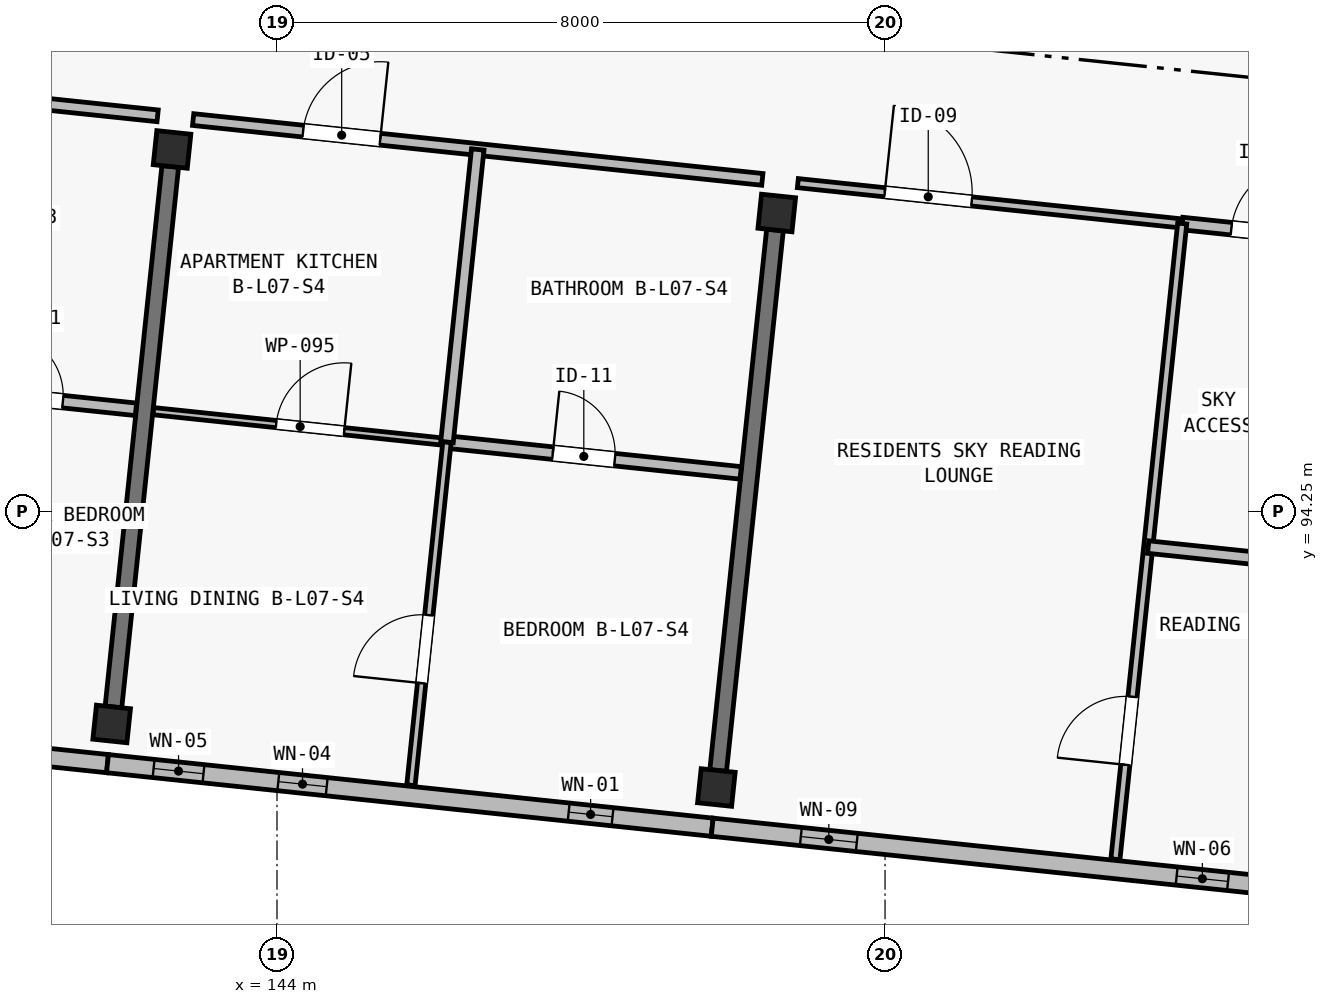
"""IFC4 building model, lengths in metres.
Left out: names, types, materials, properties, quantities, classifications, styles, units other than length and angle.
Written with IfcOpenShell. Run it as: python <this file> out.ifc"""

import sys

from ifc_helpers import new_model, si_unit, direction, frame, frame_2d, origin, origin_2d, place, context, subcontext, project, spatial, rectangle, extrude, element, fill, save


model = new_model("IFC4")
c1 = context("Model", 3, precision=1e-05, world=origin(), true_north=direction((0.0, 1.0)))
c2 = subcontext(c1, "Body", "Model", "MODEL_VIEW")
j1 = project(units=[si_unit("LENGTHUNIT", "METRE"), si_unit("PLANEANGLEUNIT", "RADIAN")], contexts=[c1])
p1 = place(None, origin())
s1 = spatial("IfcSite", under=j1, at=p1, CompositionType="ELEMENT")
p2 = place(p1, origin())
s2 = spatial("IfcBuilding", under=s1, at=p2, CompositionType="ELEMENT")
p3 = place(p2, frame((0.0, 0.0, 24.65)))
s3 = spatial("IfcBuildingStorey", under=s2, at=p3, CompositionType="ELEMENT", Elevation=24.65)
for number, where, z_axis, x_axis in (
    (1, (141.825, 91.455, 0.0), (0.0, 0.0, 1.0), (0.995, -0.105, 0.0)),
    (2, (142.619, 99.013, 0.0), (0.0, 0.0, 1.0), (0.995, -0.105, 0.0)),
    (3, (149.781, 90.619, 0.0), (0.0, 0.0, 1.0), (0.995, -0.105, 0.0)),
    (4, (150.575, 98.177, 0.0), (0.0, 0.0, 1.0), (0.995, -0.105, 0.0)),
):
    element("IfcColumn", number, at=place(p3, frame(where, z_axis=z_axis, x_axis=x_axis)), inside=s3, PredefinedType="COLUMN", context=c2, shape_type="SweptSolid", body=[
        extrude(rectangle(XDim=0.45, YDim=0.45, at=origin_2d()), origin(), (0.0, 0.0, 1.0), 3.25),
    ])
p4 = place(p3, frame((141.848, 91.679, 0.0), z_axis=(0.0, 0.0, 1.0), x_axis=(0.104553253602, 0.994519289487, 0.0)))
e5 = element("IfcWall", 5, at=p4, inside=s3, PredefinedType="SHEAR", context=c2, shape_type="SweptSolid", body=[
    extrude(rectangle(XDim=7.15, YDim=0.22, at=frame_2d((3.575, 0.0))), origin(), (0.0, 0.0, 1.0), 2.5),
])
p5 = place(p3, frame((149.804, 90.843, 0.0), z_axis=(0.0, 0.0, 1.0), x_axis=(0.104519481265, 0.994522839374, 0.0)))
e6 = element("IfcWall", 6, at=p5, inside=s3, PredefinedType="SHEAR", context=c2, shape_type="SweptSolid", body=[
    extrude(rectangle(XDim=7.15, YDim=0.22, at=frame_2d((3.575, 0.0))), origin(), (0.0, 0.0, 1.0), 2.5),
])
p6 = place(p3, frame((141.77, 90.933, 0.0), z_axis=(0.0, 0.0, 1.0), x_axis=(-0.994519156568, 0.104554517933, 0.0)))
e7 = element("IfcWall", 7, at=p6, inside=s3, PredefinedType="SOLIDWALL", context=c2, shape_type="SweptSolid", body=[
    extrude(rectangle(XDim=8.0, YDim=0.24, at=frame_2d((4.0, 0.0))), origin(), (0.0, 0.0, 1.0), 3.0),
])
p7 = place(p6, frame((5.345, 0.0, 0.0)))
e8 = element("IfcOpeningElement", 8, at=p7, cuts=e7, PredefinedType="OPENING", context=c2, shape_type="SweptSolid", body=[
    extrude(rectangle(XDim=1.8, YDim=2.12, at=frame_2d((0.9, 1.06))), frame((0.0, 0.135, 0.0), z_axis=(0.0, -1.0, 0.0), x_axis=(1.0, 0.0, 0.0)), (0.0, 0.0, 1.0), 0.27),
])
p8 = place(p6, frame((0.83, 0.0, 0.46)))
e9 = element("IfcOpeningElement", 9, at=p8, cuts=e7, PredefinedType="OPENING", context=c2, shape_type="SweptSolid", body=[
    extrude(rectangle(XDim=0.68, YDim=2.24, at=frame_2d((0.34, 1.12))), frame((0.0, 0.135, 0.0), z_axis=(0.0, -1.0, 0.0), x_axis=(1.0, 0.0, 0.0)), (0.0, 0.0, 1.0), 0.27),
])
p9 = place(p3, frame((149.726, 90.097, 0.0), z_axis=(0.0, 0.0, 1.0), x_axis=(-0.994522662826, 0.104521161134, 0.0)))
e10 = element("IfcWall", 10, at=p9, inside=s3, PredefinedType="SOLIDWALL", context=c2, shape_type="SweptSolid", body=[
    extrude(rectangle(XDim=8.0, YDim=0.24, at=frame_2d((4.0, 0.0))), origin(), (0.0, 0.0, 1.0), 3.0),
])
p10 = place(p9, frame((1.319, 0.0, 0.52)))
e11 = element("IfcOpeningElement", 11, at=p10, cuts=e10, PredefinedType="OPENING", context=c2, shape_type="SweptSolid", body=[
    extrude(rectangle(XDim=0.58, YDim=2.16, at=frame_2d((0.29, 1.08))), frame((0.0, 0.135, 0.0), z_axis=(0.0, -1.0, 0.0), x_axis=(1.0, 0.0, 0.0)), (0.0, 0.0, 1.0), 0.27),
])
p11 = place(p9, frame((5.1, 0.0, 0.52)))
e12 = element("IfcOpeningElement", 12, at=p11, cuts=e10, PredefinedType="OPENING", context=c2, shape_type="SweptSolid", body=[
    extrude(rectangle(XDim=0.64, YDim=2.18, at=frame_2d((0.32, 1.09))), frame((0.0, 0.135, 0.0), z_axis=(0.0, -1.0, 0.0), x_axis=(1.0, 0.0, 0.0)), (0.0, 0.0, 1.0), 0.27),
])
p12 = place(p9, frame((6.73, 0.0, 0.42)))
e13 = element("IfcOpeningElement", 13, at=p12, cuts=e10, PredefinedType="OPENING", context=c2, shape_type="SweptSolid", body=[
    extrude(rectangle(XDim=0.66, YDim=2.32, at=frame_2d((0.33, 1.16))), frame((0.0, 0.135, 0.0), z_axis=(0.0, -1.0, 0.0), x_axis=(1.0, 0.0, 0.0)), (0.0, 0.0, 1.0), 0.27),
])
p13 = place(p3, frame((158.204, 89.206, 0.0), z_axis=(0.0, 0.0, 1.0), x_axis=(-0.994521760736, 0.104529744196, 0.0)))
e14 = element("IfcWall", 14, at=p13, inside=s3, PredefinedType="SOLIDWALL", context=c2, shape_type="SweptSolid", body=[
    extrude(rectangle(XDim=8.525, YDim=0.24, at=frame_2d((4.262, 0.0))), origin(), (0.0, 0.0, 1.0), 3.0),
])
p14 = place(p13, frame((1.701, 0.0, 0.42)))
e15 = element("IfcOpeningElement", 15, at=p14, cuts=e14, PredefinedType="OPENING", context=c2, shape_type="SweptSolid", body=[
    extrude(rectangle(XDim=0.68, YDim=2.24, at=frame_2d((0.34, 1.12))), frame((0.0, 0.135, 0.0), z_axis=(0.0, -1.0, 0.0), x_axis=(1.0, 0.0, 0.0)), (0.0, 0.0, 1.0), 0.27),
])
p15 = place(p13, frame((6.612, 0.0, 0.42)))
e16 = element("IfcOpeningElement", 16, at=p15, cuts=e14, PredefinedType="OPENING", context=c2, shape_type="SweptSolid", body=[
    extrude(rectangle(XDim=0.74, YDim=2.26, at=frame_2d((0.37, 1.13))), frame((0.0, 0.135, 0.0), z_axis=(0.0, -1.0, 0.0), x_axis=(1.0, 0.0, 0.0)), (0.0, 0.0, 1.0), 0.27),
])
p16 = place(p3, frame((137.949, 99.927, 0.0), z_axis=(0.0, 0.0, 1.0), x_axis=(0.994526220308, -0.104487306019, 0.0)))
e17 = element("IfcWall", 17, at=p16, inside=s3, PredefinedType="PARTITIONING", context=c2, shape_type="SweptSolid", body=[
    extrude(rectangle(XDim=4.505, YDim=0.155, at=frame_2d((2.252, 0.0))), origin(), (0.0, 0.0, 1.0), 2.97),
])
p17 = place(p16, frame((0.557, 0.0, 0.0)))
e18 = element("IfcOpeningElement", 18, at=p17, cuts=e17, PredefinedType="OPENING", context=c2, shape_type="SweptSolid", body=[
    extrude(rectangle(XDim=0.98, YDim=2.15, at=frame_2d((0.49, 1.075))), frame((0.0, 0.093, 0.0), z_axis=(0.0, -1.0, 0.0), x_axis=(1.0, 0.0, 0.0)), (0.0, 0.0, 1.0), 0.185),
])
p18 = place(p3, frame((139.668, 95.855, 0.0), z_axis=(0.0, 0.0, 1.0), x_axis=(0.994522631864, -0.10452145574, 0.0)))
e19 = element("IfcWall", 19, at=p18, inside=s3, PredefinedType="PLUMBINGWALL", context=c2, shape_type="SweptSolid", body=[
    extrude(rectangle(XDim=2.49, YDim=0.165, at=frame_2d((1.245, 0.0))), origin(), (0.0, 0.0, 1.0), 2.97),
])
p19 = place(p18, frame((0.703, 0.0, 0.0)))
e20 = element("IfcOpeningElement", 20, at=p19, cuts=e19, PredefinedType="OPENING", context=c2, shape_type="SweptSolid", body=[
    extrude(rectangle(XDim=0.82, YDim=2.08, at=frame_2d((0.41, 1.04))), frame((0.0, 0.097, 0.0), z_axis=(0.0, -1.0, 0.0), x_axis=(1.0, 0.0, 0.0)), (0.0, 0.0, 1.0), 0.195),
])
p20 = place(p3, frame((142.897, 99.406, 0.0), z_axis=(0.0, 0.0, 1.0), x_axis=(0.994521785195, -0.104529511491, 0.0)))
e21 = element("IfcWall", 21, at=p20, inside=s3, PredefinedType="PARTITIONING", context=c2, shape_type="SweptSolid", body=[
    extrude(rectangle(XDim=7.53, YDim=0.155, at=frame_2d((3.765, 0.0))), origin(), (0.0, 0.0, 1.0), 2.97),
])
p21 = place(p20, frame((1.455, 0.0, 0.0)))
e22 = element("IfcOpeningElement", 22, at=p21, cuts=e21, PredefinedType="OPENING", context=c2, shape_type="SweptSolid", body=[
    extrude(rectangle(XDim=1.02, YDim=2.2, at=frame_2d((0.51, 1.1))), frame((0.0, 0.093, 0.0), z_axis=(0.0, -1.0, 0.0), x_axis=(1.0, 0.0, 0.0)), (0.0, 0.0, 1.0), 0.185),
])
p22 = place(p3, frame((142.373, 95.57, 0.0), z_axis=(0.0, 0.0, 1.0), x_axis=(0.994524375082, -0.104504867671, 0.0)))
e23 = element("IfcWall", 23, at=p22, inside=s3, PredefinedType="PARTITIONING", context=c2, shape_type="SweptSolid", body=[
    extrude(rectangle(XDim=3.885, YDim=0.095, at=frame_2d((1.942, 0.0))), origin(), (0.0, 0.0, 1.0), 2.97),
])
p23 = place(p22, frame((1.625, 0.0, 0.0)))
e24 = element("IfcOpeningElement", 24, at=p23, cuts=e23, PredefinedType="OPENING", context=c2, shape_type="SweptSolid", body=[
    extrude(rectangle(XDim=0.9, YDim=2.1, at=frame_2d((0.45, 1.05))), frame((0.0, 0.062, 0.0), z_axis=(0.0, -1.0, 0.0), x_axis=(1.0, 0.0, 0.0)), (0.0, 0.0, 1.0), 0.125),
])
p24 = place(p3, frame((146.237, 95.164, 0.0), z_axis=(0.0, 0.0, 1.0), x_axis=(0.994517841934, -0.104567021925, 0.0)))
e25 = element("IfcWall", 25, at=p24, inside=s3, PredefinedType="PLUMBINGWALL", context=c2, shape_type="SweptSolid", body=[
    extrude(rectangle(XDim=3.885, YDim=0.165, at=frame_2d((1.942, 0.0))), origin(), (0.0, 0.0, 1.0), 2.97),
])
p25 = place(p24, frame((1.4, 0.0, 0.0)))
e26 = element("IfcOpeningElement", 26, at=p25, cuts=e25, PredefinedType="OPENING", context=c2, shape_type="SweptSolid", body=[
    extrude(rectangle(XDim=0.82, YDim=2.08, at=frame_2d((0.41, 1.04))), frame((0.0, 0.097, 0.0), z_axis=(0.0, -1.0, 0.0), x_axis=(1.0, 0.0, 0.0)), (0.0, 0.0, 1.0), 0.195),
])
p26 = place(p3, frame((145.762, 90.649, 0.0), z_axis=(0.0, 0.0, 1.0), x_axis=(0.104539221709, 0.994520764552, 0.0)))
e27 = element("IfcWall", 27, at=p26, inside=s3, PredefinedType="PARTITIONING", context=c2, shape_type="SweptSolid", body=[
    extrude(rectangle(XDim=4.54, YDim=0.11, at=frame_2d((2.27, 0.0))), origin(), (0.0, 0.0, 1.0), 2.97),
])
p27 = place(p26, frame((1.35, 0.0, 0.0)))
e28 = element("IfcOpeningElement", 28, at=p27, cuts=e27, PredefinedType="OPENING", context=c2, shape_type="SweptSolid", body=[
    extrude(rectangle(XDim=0.9, YDim=2.1, at=frame_2d((0.45, 1.05))), frame((0.0, 0.07, 0.0), z_axis=(0.0, -1.0, 0.0), x_axis=(1.0, 0.0, 0.0)), (0.0, 0.0, 1.0), 0.14),
])
p28 = place(p3, frame((146.237, 95.164, 0.0), z_axis=(0.0, 0.0, 1.0), x_axis=(0.10453700162, 0.994520997914, 0.0)))
e29 = element("IfcWall", 29, at=p28, inside=s3, PredefinedType="PLUMBINGWALL", context=c2, shape_type="SweptSolid", body=[
    extrude(rectangle(XDim=3.87, YDim=0.165, at=frame_2d((1.935, 0.0))), origin(), (0.0, 0.0, 1.0), 2.97),
])
p29 = place(p3, frame((150.853, 98.57, 0.0), z_axis=(0.0, 0.0, 1.0), x_axis=(0.994522539851, -0.104522331238, 0.0)))
e30 = element("IfcWall", 30, at=p29, inside=s3, PredefinedType="PARTITIONING", context=c2, shape_type="SweptSolid", body=[
    extrude(rectangle(XDim=5.085, YDim=0.12, at=frame_2d((2.542, 0.0))), origin(), (0.0, 0.0, 1.0), 2.97),
])
p30 = place(p29, frame((1.15, 0.0, 0.0)))
e31 = element("IfcOpeningElement", 31, at=p30, cuts=e30, PredefinedType="OPENING", context=c2, shape_type="SweptSolid", body=[
    extrude(rectangle(XDim=1.15, YDim=2.15, at=frame_2d((0.575, 1.075))), frame((0.0, 0.075, 0.0), z_axis=(0.0, -1.0, 0.0), x_axis=(1.0, 0.0, 0.0)), (0.0, 0.0, 1.0), 0.15),
])
p31 = place(p3, frame((155.91, 98.039, 0.0), z_axis=(0.0, 0.0, 1.0), x_axis=(0.994526447543, -0.104485143144, 0.0)))
e32 = element("IfcWall", 32, at=p31, inside=s3, PredefinedType="PLUMBINGWALL", context=c2, shape_type="SweptSolid", body=[
    extrude(rectangle(XDim=2.61, YDim=0.165, at=frame_2d((1.305, 0.0))), origin(), (0.0, 0.0, 1.0), 2.97),
])
p32 = place(p31, frame((0.65, 0.0, 0.0)))
e33 = element("IfcOpeningElement", 33, at=p32, cuts=e32, PredefinedType="OPENING", context=c2, shape_type="SweptSolid", body=[
    extrude(rectangle(XDim=0.96, YDim=2.12, at=frame_2d((0.48, 1.06))), frame((0.0, 0.097, 0.0), z_axis=(0.0, -1.0, 0.0), x_axis=(1.0, 0.0, 0.0)), (0.0, 0.0, 1.0), 0.195),
])
p33 = place(p3, frame((155.031, 89.675, 0.0), z_axis=(0.0, 0.0, 1.0), x_axis=(0.10453518206, 0.994521189172, 0.0)))
e34 = element("IfcWall", 34, at=p33, inside=s3, PredefinedType="PARTITIONING", context=c2, shape_type="SweptSolid", body=[
    extrude(rectangle(XDim=8.41, YDim=0.12, at=frame_2d((4.205, 0.0))), origin(), (0.0, 0.0, 1.0), 2.97),
])
p34 = place(p33, frame((1.25, 0.0, 0.0)))
e35 = element("IfcOpeningElement", 35, at=p34, cuts=e34, PredefinedType="OPENING", context=c2, shape_type="SweptSolid", body=[
    extrude(rectangle(XDim=0.9, YDim=2.1, at=frame_2d((0.45, 1.05))), frame((0.0, 0.075, 0.0), z_axis=(0.0, -1.0, 0.0), x_axis=(1.0, 0.0, 0.0)), (0.0, 0.0, 1.0), 0.15),
])
p35 = place(p3, frame((155.463, 93.782, 0.0), z_axis=(0.0, 0.0, 1.0), x_axis=(0.994521452323, -0.104532678478, 0.0)))
e36 = element("IfcWall", 36, at=p35, inside=s3, PredefinedType="PLUMBINGWALL", context=c2, shape_type="SweptSolid", body=[
    extrude(rectangle(XDim=2.59, YDim=0.165, at=frame_2d((1.295, 0.0))), origin(), (0.0, 0.0, 1.0), 2.97),
])
p36 = place(p10, origin())
e37 = element("IfcWindow", 37, at=p36, inside=s3, PartitioningType="SINGLE_PANEL", PredefinedType="WINDOW", context=c2, shape_type="SweptSolid", body=[
    extrude(rectangle(XDim=0.58, YDim=2.16, at=frame_2d((0.29, 1.08))), frame((0.0, 0.03, 0.0), z_axis=(0.0, -1.0, 0.0), x_axis=(1.0, 0.0, 0.0)), (0.0, 0.0, 1.0), 0.06),
])
fill(e11, e37)
p37 = place(p11, origin())
e38 = element("IfcWindow", 38, at=p37, inside=s3, PartitioningType="SINGLE_PANEL", PredefinedType="WINDOW", context=c2, shape_type="SweptSolid", body=[
    extrude(rectangle(XDim=0.64, YDim=2.18, at=frame_2d((0.32, 1.09))), frame((0.0, 0.03, 0.0), z_axis=(0.0, -1.0, 0.0), x_axis=(1.0, 0.0, 0.0)), (0.0, 0.0, 1.0), 0.06),
])
fill(e12, e38)
p38 = place(p12, origin())
e39 = element("IfcWindow", 39, at=p38, inside=s3, PartitioningType="SINGLE_PANEL", PredefinedType="WINDOW", context=c2, shape_type="SweptSolid", body=[
    extrude(rectangle(XDim=0.66, YDim=2.32, at=frame_2d((0.33, 1.16))), frame((0.0, 0.03, 0.0), z_axis=(0.0, -1.0, 0.0), x_axis=(1.0, 0.0, 0.0)), (0.0, 0.0, 1.0), 0.06),
])
fill(e13, e39)
p39 = place(p14, origin())
e40 = element("IfcWindow", 40, at=p39, inside=s3, PartitioningType="SINGLE_PANEL", PredefinedType="WINDOW", context=c2, shape_type="SweptSolid", body=[
    extrude(rectangle(XDim=0.68, YDim=2.24, at=frame_2d((0.34, 1.12))), frame((0.0, 0.03, 0.0), z_axis=(0.0, -1.0, 0.0), x_axis=(1.0, 0.0, 0.0)), (0.0, 0.0, 1.0), 0.06),
])
fill(e15, e40)
p40 = place(p15, origin())
e41 = element("IfcWindow", 41, at=p40, inside=s3, PartitioningType="SINGLE_PANEL", PredefinedType="WINDOW", context=c2, shape_type="SweptSolid", body=[
    extrude(rectangle(XDim=0.74, YDim=2.26, at=frame_2d((0.37, 1.13))), frame((0.0, 0.03, 0.0), z_axis=(0.0, -1.0, 0.0), x_axis=(1.0, 0.0, 0.0)), (0.0, 0.0, 1.0), 0.06),
])
fill(e16, e41)
p41 = place(p19, origin())
e42 = element("IfcDoor", 42, at=p41, inside=s3, OperationType="SINGLE_SWING_LEFT", PredefinedType="DOOR", context=c2, shape_type="SweptSolid", body=[
    extrude(rectangle(XDim=0.82, YDim=2.08, at=frame_2d((0.41, 1.04))), frame((0.0, 0.025, 0.0), z_axis=(0.0, -1.0, 0.0), x_axis=(1.0, 0.0, 0.0)), (0.0, 0.0, 1.0), 0.05),
])
fill(e20, e42)
p42 = place(p21, origin())
e43 = element("IfcDoor", 43, at=p42, inside=s3, OperationType="SINGLE_SWING_RIGHT", PredefinedType="DOOR", context=c2, shape_type="SweptSolid", body=[
    extrude(rectangle(XDim=1.02, YDim=2.2, at=frame_2d((0.51, 1.1))), frame((0.0, 0.025, 0.0), z_axis=(0.0, -1.0, 0.0), x_axis=(1.0, 0.0, 0.0)), (0.0, 0.0, 1.0), 0.05),
])
fill(e22, e43)
p43 = place(p23, origin())
e44 = element("IfcDoor", 44, at=p43, inside=s3, OperationType="SINGLE_SWING_RIGHT", PredefinedType="DOOR", context=c2, shape_type="SweptSolid", body=[
    extrude(rectangle(XDim=0.9, YDim=2.1, at=frame_2d((0.45, 1.05))), frame((0.0, 0.025, 0.0), z_axis=(0.0, -1.0, 0.0), x_axis=(1.0, 0.0, 0.0)), (0.0, 0.0, 1.0), 0.05),
])
fill(e24, e44)
p44 = place(p25, origin())
e45 = element("IfcDoor", 45, at=p44, inside=s3, OperationType="SINGLE_SWING_LEFT", PredefinedType="DOOR", context=c2, shape_type="SweptSolid", body=[
    extrude(rectangle(XDim=0.82, YDim=2.08, at=frame_2d((0.41, 1.04))), frame((0.0, 0.025, 0.0), z_axis=(0.0, -1.0, 0.0), x_axis=(1.0, 0.0, 0.0)), (0.0, 0.0, 1.0), 0.05),
])
fill(e26, e45)
p45 = place(p27, origin())
e46 = element("IfcDoor", 46, at=p45, inside=s3, OperationType="SINGLE_SWING_LEFT", PredefinedType="DOOR", context=c2, shape_type="SweptSolid", body=[
    extrude(rectangle(XDim=0.9, YDim=2.1, at=frame_2d((0.45, 1.05))), frame((0.0, 0.025, 0.0), z_axis=(0.0, -1.0, 0.0), x_axis=(1.0, 0.0, 0.0)), (0.0, 0.0, 1.0), 0.05),
])
fill(e28, e46)
p46 = place(p30, origin())
e47 = element("IfcDoor", 47, at=p46, inside=s3, OperationType="SINGLE_SWING_LEFT", PredefinedType="DOOR", context=c2, shape_type="SweptSolid", body=[
    extrude(rectangle(XDim=1.15, YDim=2.15, at=frame_2d((0.575, 1.075))), frame((0.0, 0.025, 0.0), z_axis=(0.0, -1.0, 0.0), x_axis=(1.0, 0.0, 0.0)), (0.0, 0.0, 1.0), 0.05),
])
fill(e31, e47)
p47 = place(p32, origin())
e48 = element("IfcDoor", 48, at=p47, inside=s3, OperationType="SINGLE_SWING_RIGHT", PredefinedType="DOOR", context=c2, shape_type="SweptSolid", body=[
    extrude(rectangle(XDim=0.96, YDim=2.12, at=frame_2d((0.48, 1.06))), frame((0.0, 0.025, 0.0), z_axis=(0.0, -1.0, 0.0), x_axis=(1.0, 0.0, 0.0)), (0.0, 0.0, 1.0), 0.05),
])
fill(e33, e48)
p48 = place(p34, origin())
e49 = element("IfcDoor", 49, at=p48, inside=s3, OperationType="SINGLE_SWING_LEFT", PredefinedType="DOOR", context=c2, shape_type="SweptSolid", body=[
    extrude(rectangle(XDim=0.9, YDim=2.1, at=frame_2d((0.45, 1.05))), frame((0.0, 0.025, 0.0), z_axis=(0.0, -1.0, 0.0), x_axis=(1.0, 0.0, 0.0)), (0.0, 0.0, 1.0), 0.05),
])
fill(e35, e49)
save(model, sys.argv[1])
